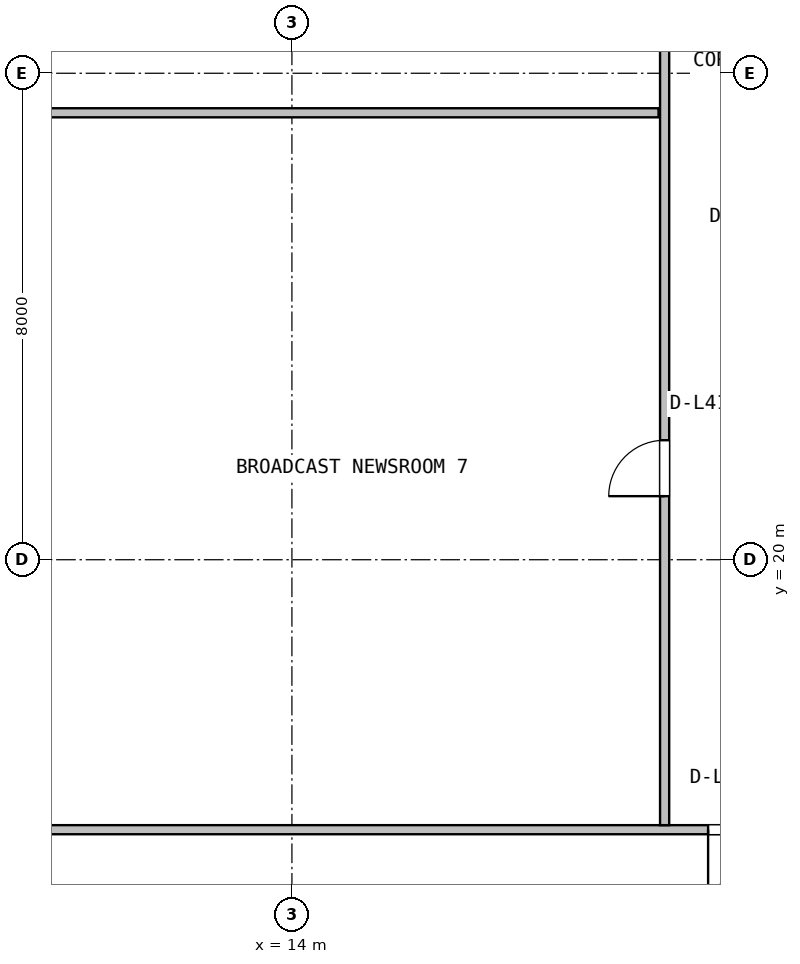
"""IFC4 building model, lengths in metres.
Left out: names, types, materials, properties, quantities, classifications, styles, units other than length and angle.
Written with IfcOpenShell. Run it as: python <this file> out.ifc"""

import sys

from ifc_helpers import new_model, si_unit, direction, frame, frame_2d, origin, place, context, subcontext, project, spatial, rectangle, extrude, source, transform, mapped, element, fill, save


model = new_model("IFC4")
c1 = context("Model", 3, precision=1e-05, world=origin(), true_north=direction((0.0, 1.0)))
c2 = subcontext(c1, "Body", "Model", "MODEL_VIEW")
j1 = project(units=[si_unit("LENGTHUNIT", "METRE"), si_unit("PLANEANGLEUNIT", "RADIAN")], contexts=[c1])
p1 = place(None, origin())
s1 = spatial("IfcSite", under=j1, at=p1, CompositionType="ELEMENT")
p2 = place(p1, origin())
s2 = spatial("IfcBuilding", under=s1, at=p2, CompositionType="ELEMENT")
p3 = place(p2, frame((0.0, 0.0, 168.6)))
s3 = spatial("IfcBuildingStorey", under=s2, at=p3, CompositionType="ELEMENT", Elevation=168.6)
p4 = place(p3, frame((7.18, 15.56, 0.0), z_axis=(0.0, 0.0, 1.0), x_axis=(1.0, 0.0, 0.0)))
e1 = element("IfcWall", 1, at=p4, inside=s3, PredefinedType="PARTITIONING", context=c2, shape_type="SweptSolid", body=[
    extrude(rectangle(XDim=53.64, YDim=0.15, at=frame_2d((26.82, 0.0))), origin(), (0.0, 0.0, 1.0), 2.909),
])
p5 = place(p4, frame((13.665, 0.0, 0.0)))
e2 = element("IfcOpeningElement", 2, at=p5, cuts=e1, PredefinedType="OPENING", context=c2, shape_type="SweptSolid", body=[
    extrude(rectangle(XDim=0.92, YDim=2.08, at=frame_2d((0.46, 1.04))), frame((0.0, 0.085, 0.0), z_axis=(0.0, -1.0, 0.0), x_axis=(1.0, 0.0, 0.0)), (0.0, 0.0, 1.0), 0.17),
])
p6 = place(p4, frame((17.955, 0.0, 0.0)))
e3 = element("IfcOpeningElement", 3, at=p6, cuts=e1, PredefinedType="OPENING", context=c2, shape_type="SweptSolid", body=[
    extrude(rectangle(XDim=0.92, YDim=2.08, at=frame_2d((0.46, 1.04))), frame((0.0, 0.085, 0.0), z_axis=(0.0, -1.0, 0.0), x_axis=(1.0, 0.0, 0.0)), (0.0, 0.0, 1.0), 0.17),
])
p7 = place(p4, frame((24.915, 0.0, 0.0)))
e4 = element("IfcOpeningElement", 4, at=p7, cuts=e1, PredefinedType="OPENING", context=c2, shape_type="SweptSolid", body=[
    extrude(rectangle(XDim=1.05, YDim=2.1, at=frame_2d((0.525, 1.05))), frame((0.0, 0.085, 0.0), z_axis=(0.0, -1.0, 0.0), x_axis=(1.0, 0.0, 0.0)), (0.0, 0.0, 1.0), 0.17),
])
p8 = place(p4, frame((31.13, 0.0, 0.0)))
e5 = element("IfcOpeningElement", 5, at=p8, cuts=e1, PredefinedType="OPENING", context=c2, shape_type="SweptSolid", body=[
    extrude(rectangle(XDim=0.88, YDim=2.06, at=frame_2d((0.44, 1.03))), frame((0.0, 0.085, 0.0), z_axis=(0.0, -1.0, 0.0), x_axis=(1.0, 0.0, 0.0)), (0.0, 0.0, 1.0), 0.17),
])
p9 = place(p4, frame((36.41, 0.0, 0.0)))
e6 = element("IfcOpeningElement", 6, at=p9, cuts=e1, PredefinedType="OPENING", context=c2, shape_type="SweptSolid", body=[
    extrude(rectangle(XDim=1.0, YDim=2.1, at=frame_2d((0.5, 1.05))), frame((0.0, 0.085, 0.0), z_axis=(0.0, -1.0, 0.0), x_axis=(1.0, 0.0, 0.0)), (0.0, 0.0, 1.0), 0.17),
])
p10 = place(p4, frame((40.765, 0.0, 0.0)))
e7 = element("IfcOpeningElement", 7, at=p10, cuts=e1, PredefinedType="OPENING", context=c2, shape_type="SweptSolid", body=[
    extrude(rectangle(XDim=0.88, YDim=2.06, at=frame_2d((0.44, 1.03))), frame((0.0, 0.085, 0.0), z_axis=(0.0, -1.0, 0.0), x_axis=(1.0, 0.0, 0.0)), (0.0, 0.0, 1.0), 0.17),
])
p11 = place(p3, frame((20.13, 15.635, 0.0), z_axis=(0.0, 0.0, 1.0), x_axis=(0.0, 1.0, 0.0)))
e8 = element("IfcWall", 8, at=p11, inside=s3, PredefinedType="PARTITIONING", context=c2, shape_type="SweptSolid", body=[
    extrude(rectangle(XDim=17.64, YDim=0.15, at=frame_2d((8.82, 0.0))), origin(), (0.0, 0.0, 1.0), 3.222),
])
p12 = place(p11, frame((5.41, 0.0, 0.0)))
e9 = element("IfcOpeningElement", 9, at=p12, cuts=e8, PredefinedType="OPENING", context=c2, shape_type="SweptSolid", body=[
    extrude(rectangle(XDim=0.92, YDim=2.08, at=frame_2d((0.46, 1.04))), frame((0.0, 0.085, 0.0), z_axis=(0.0, -1.0, 0.0), x_axis=(1.0, 0.0, 0.0)), (0.0, 0.0, 1.0), 0.17),
])
p13 = place(p3, frame((7.18, 27.35, 0.0), z_axis=(0.0, 0.0, 1.0), x_axis=(1.0, 0.0, 0.0)))
e10 = element("IfcWall", 10, at=p13, inside=s3, PredefinedType="PARTITIONING", context=c2, shape_type="SweptSolid", body=[
    extrude(rectangle(XDim=12.85, YDim=0.15, at=frame_2d((6.425, 0.0))), origin(), (0.0, 0.0, 1.0), 3.108),
])
m1 = source(origin(), c2, "Body", "SweptSolid", [
    extrude(rectangle(XDim=0.92, YDim=2.08, at=frame_2d((0.46, 1.04))), frame((0.0, 0.025, 0.0), z_axis=(0.0, -1.0, 0.0), x_axis=(1.0, 0.0, 0.0)), (0.0, 0.0, 1.0), 0.05),
])
p14 = place(p5, frame((0.92, 0.0, 0.0), z_axis=(0.0, 0.0, 1.0), x_axis=(-1.0, 0.0, 0.0)))
e11 = element("IfcDoor", 11, at=p14, inside=s3, OperationType="SINGLE_SWING_LEFT", PredefinedType="DOOR", context=c2, shape_type="MappedRepresentation", body=[
    mapped(m1, transform((0.0, 0.0, 0.0), x_axis=(1.0, 0.0, 0.0), y_axis=(0.0, 1.0, 0.0), z_axis=(0.0, 0.0, 1.0), scale=1.0)),
])
fill(e2, e11)
p15 = place(p12, origin())
e12 = element("IfcDoor", 12, at=p15, inside=s3, OperationType="SINGLE_SWING_LEFT", PredefinedType="DOOR", context=c2, shape_type="MappedRepresentation", body=[
    mapped(m1, transform((0.0, 0.0, 0.0), x_axis=(1.0, 0.0, 0.0), y_axis=(0.0, 1.0, 0.0), z_axis=(0.0, 0.0, 1.0), scale=1.0)),
])
fill(e9, e12)
save(model, sys.argv[1])
